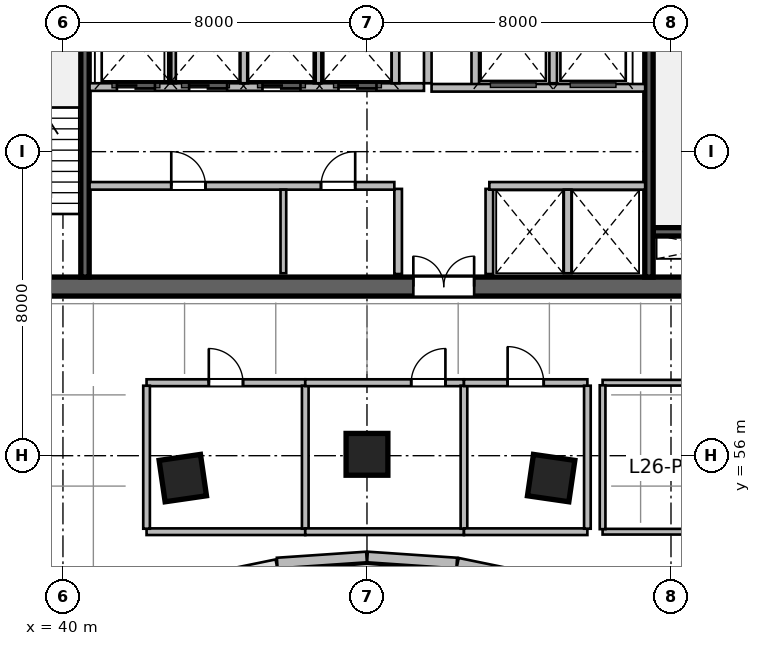
"""IFC4 building model, lengths in metres.
Left out: names, types, materials, properties, quantities, classifications, styles, units other than length and angle.
Written with IfcOpenShell. Run it as: python <this file> out.ifc"""

import sys

from ifc_helpers import new_model, si_unit, direction, frame, frame_2d, origin, origin_2d, place, context, subcontext, project, spatial, rectangle, extrude, source, transform, mapped, element, fill, save


model = new_model("IFC4")
c1 = context("Model", 3, precision=1e-05, world=origin(), true_north=direction((0.0, 1.0)))
c2 = subcontext(c1, "Body", "Model", "MODEL_VIEW")
j1 = project(units=[si_unit("LENGTHUNIT", "METRE"), si_unit("PLANEANGLEUNIT", "RADIAN")], contexts=[c1])
p1 = place(None, origin())
s1 = spatial("IfcSite", under=j1, at=p1, CompositionType="ELEMENT")
p2 = place(p1, origin())
s2 = spatial("IfcBuilding", under=s1, at=p2, CompositionType="ELEMENT")
p3 = place(p2, frame((0.0, 0.0, 111.6)))
s3 = spatial("IfcBuildingStorey", under=s2, at=p3, CompositionType="ELEMENT", Elevation=111.6)
m1 = source(origin(), c2, "Body", "SweptSolid", [
    extrude(rectangle(XDim=21.6, YDim=0.5, at=frame_2d((10.8, 0.0))), origin(), (0.0, 0.0, 1.0), 3.9),
])
p4 = place(p3, frame((37.2, 60.45, 0.0), z_axis=(0.0, 0.0, 1.0), x_axis=(1.0, 0.0, 0.0)))
e1 = element("IfcWall", 1, at=p4, inside=s3, PredefinedType="SHEAR", context=c2, shape_type="MappedRepresentation", body=[
    mapped(m1, transform((0.0, 0.0, 0.0), scale=1.0)),
])
p5 = place(p4, frame((1.1, 0.0, 0.0)))
e2 = element("IfcOpeningElement", 2, at=p5, cuts=e1, PredefinedType="OPENING", context=c2, shape_type="SweptSolid", body=[
    extrude(rectangle(XDim=1.15, YDim=2.15, at=frame_2d((0.575, 1.075))), frame((0.0, 0.26, 0.0), z_axis=(0.0, -1.0, 0.0), x_axis=(1.0, 0.0, 0.0)), (0.0, 0.0, 1.0), 0.52),
])
p6 = place(p4, frame((19.5, 0.0, 0.0)))
e3 = element("IfcOpeningElement", 3, at=p6, cuts=e1, PredefinedType="OPENING", context=c2, shape_type="SweptSolid", body=[
    extrude(rectangle(XDim=0.9, YDim=2.1, at=frame_2d((0.45, 1.05))), frame((0.0, 0.26, 0.0), z_axis=(0.0, -1.0, 0.0), x_axis=(1.0, 0.0, 0.0)), (0.0, 0.0, 1.0), 0.52),
])
p7 = place(p4, frame((12.02, 0.0, 0.0)))
e4 = element("IfcOpeningElement", 4, at=p7, cuts=e1, PredefinedType="OPENING", context=c2, shape_type="SweptSolid", body=[
    extrude(rectangle(XDim=1.6, YDim=2.15, at=frame_2d((0.8, 1.075))), frame((0.0, 0.26, 0.0), z_axis=(0.0, -1.0, 0.0), x_axis=(1.0, 0.0, 0.0)), (0.0, 0.0, 1.0), 0.52),
])
m2 = source(origin(), c2, "Body", "SweptSolid", [
    extrude(rectangle(XDim=3.27, YDim=0.22, at=frame_2d((1.635, 0.0))), origin(), (0.0, 0.0, 1.0), 3.9),
])
p8 = place(p3, frame((55.53, 61.89, 0.0), z_axis=(0.0, 0.0, 1.0), x_axis=(1.0, 0.0, 0.0)))
e5 = element("IfcWall", 5, at=p8, inside=s3, PredefinedType="SHEAR", context=c2, shape_type="MappedRepresentation", body=[
    mapped(m2, transform((0.0, 0.0, 0.0), scale=1.0)),
])
m3 = source(origin(), c2, "Body", "SweptSolid", [
    extrude(rectangle(XDim=11.0, YDim=0.22, at=frame_2d((5.5, 0.0))), origin(), (0.0, 0.0, 1.0), 3.9),
])
p9 = place(p3, frame((40.58, 60.7, 0.0), z_axis=(0.0, 0.0, 1.0), x_axis=(0.0, 1.0, 0.0)))
e6 = element("IfcWall", 6, at=p9, inside=s3, PredefinedType="SHEAR", context=c2, shape_type="MappedRepresentation", body=[
    mapped(m3, transform((0.0, 0.0, 0.0), scale=1.0)),
])
p10 = place(p3, frame((55.42, 60.7, 0.0), z_axis=(0.0, 0.0, 1.0), x_axis=(0.0, 1.0, 0.0)))
e7 = element("IfcWall", 7, at=p10, inside=s3, PredefinedType="SHEAR", context=c2, shape_type="MappedRepresentation", body=[
    mapped(m3, transform((0.0, 0.0, 0.0), scale=1.0)),
])
p11 = place(p10, frame((9.545, 0.0, 0.0)))
e8 = element("IfcOpeningElement", 8, at=p11, cuts=e7, PredefinedType="OPENING", context=c2, shape_type="SweptSolid", body=[
    extrude(rectangle(XDim=1.15, YDim=2.15, at=frame_2d((0.575, 1.075))), frame((0.0, 0.12, 0.0), z_axis=(0.0, -1.0, 0.0), x_axis=(1.0, 0.0, 0.0)), (0.0, 0.0, 1.0), 0.24),
])
m4 = source(origin(), c2, "Body", "SweptSolid", [
    extrude(rectangle(XDim=1.1, YDim=1.1, at=origin_2d()), origin(), (0.0, 0.0, 1.0), 3.9),
])
for number, where, z_axis, x_axis in (
    (9, (43.154, 55.411, 0.0), (0.0, 0.0, 1.0), (-0.143, 0.99, 0.0)),
    (10, (48.0, 56.036, 0.0), (0.0, 0.0, 1.0), (0.0, 1.0, 0.0)),
    (11, (52.846, 55.411, 0.0), (0.0, 0.0, 1.0), (0.143, 0.99, 0.0)),
):
    element("IfcColumn", number, at=place(p3, frame(where, z_axis=z_axis, x_axis=x_axis)), inside=s3, PredefinedType="COLUMN", context=c2, shape_type="MappedRepresentation", body=[
        mapped(m4, transform((0.0, 0.0, 0.0), scale=1.0)),
    ])
m5 = source(origin(), c2, "Body", "SweptSolid", [
    extrude(rectangle(XDim=2.374, YDim=0.28, at=frame_2d((1.187, 0.0))), origin(), (0.0, 0.0, 1.0), 3.65),
])
p12 = place(p3, frame((52.711, 52.695, 0.0), z_axis=(0.0, 0.0, 1.0), x_axis=(-0.979619827472, 0.200860632341, 0.0)))
e12 = element("IfcWall", 12, at=p12, inside=s3, PredefinedType="SOLIDWALL", context=c2, shape_type="MappedRepresentation", body=[
    mapped(m5, transform((0.0, 0.0, 0.0), scale=1.0)),
])
m6 = source(origin(), c2, "Body", "SweptSolid", [
    extrude(rectangle(XDim=2.355, YDim=0.28, at=frame_2d((1.177, 0.0))), origin(), (0.0, 0.0, 1.0), 3.65),
])
for number, where, z_axis, x_axis in (
    (13, (50.362, 53.175, 0.0), (0.0, 0.0, 1.0), (-0.998, 0.068, 0.0)),
    (14, (47.988, 53.335, 0.0), (0.0, 0.0, 1.0), (-0.998, -0.068, 0.0)),
):
    element("IfcWall", number, at=place(p3, frame(where, z_axis=z_axis, x_axis=x_axis)), inside=s3, PredefinedType="SOLIDWALL", context=c2, shape_type="MappedRepresentation", body=[
        mapped(m6, transform((0.0, 0.0, 0.0), scale=1.0)),
    ])
m7 = source(origin(), c2, "Body", "SweptSolid", [
    extrude(rectangle(XDim=2.24, YDim=0.2, at=frame_2d((1.12, 0.0))), origin(), (0.0, 0.0, 1.0), 3.65),
])
for number, where, z_axis, x_axis in (
    (15, (48.82, 60.78, 0.0), (0.0, 0.0, 1.0), (0.0, 1.0, 0.0)),
    (16, (51.22, 60.78, 0.0), (0.0, 0.0, 1.0), (0.0, 1.0, 0.0)),
):
    element("IfcWall", number, at=place(p3, frame(where, z_axis=z_axis, x_axis=x_axis)), inside=s3, PredefinedType="SOLIDWALL", context=c2, shape_type="MappedRepresentation", body=[
        mapped(m7, transform((0.0, 0.0, 0.0), scale=1.0)),
    ])
m8 = source(origin(), c2, "Body", "SweptSolid", [
    extrude(rectangle(XDim=5.8, YDim=0.2, at=frame_2d((2.9, 0.0))), origin(), (0.0, 0.0, 1.0), 3.65),
])
p13 = place(p3, frame((49.6, 65.8, 0.0), z_axis=(0.0, 0.0, 1.0), x_axis=(0.0, 1.0, 0.0)))
e17 = element("IfcWall", 17, at=p13, inside=s3, PredefinedType="SOLIDWALL", context=c2, shape_type="MappedRepresentation", body=[
    mapped(m8, transform((0.0, 0.0, 0.0), scale=1.0)),
])
m9 = source(origin(), c2, "Body", "SweptSolid", [
    extrude(rectangle(XDim=2.58, YDim=0.2, at=frame_2d((1.29, 0.0))), origin(), (0.0, 0.0, 1.0), 3.65),
])
p14 = place(p3, frame((50.85, 65.68, 0.0), z_axis=(0.0, 0.0, 1.0), x_axis=(0.0, 1.0, 0.0)))
e18 = element("IfcWall", 18, at=p14, inside=s3, PredefinedType="SOLIDWALL", context=c2, shape_type="MappedRepresentation", body=[
    mapped(m9, transform((0.0, 0.0, 0.0), scale=1.0)),
])
m10 = source(origin(), c2, "Body", "SweptSolid", [
    extrude(rectangle(XDim=2.4, YDim=0.2, at=frame_2d((1.2, 0.0))), origin(), (0.0, 0.0, 1.0), 3.65),
])
p15 = place(p3, frame((52.9, 65.8, 0.0), z_axis=(0.0, 0.0, 1.0), x_axis=(0.0, 1.0, 0.0)))
e19 = element("IfcWall", 19, at=p15, inside=s3, PredefinedType="SOLIDWALL", context=c2, shape_type="MappedRepresentation", body=[
    mapped(m10, transform((0.0, 0.0, 0.0), scale=1.0)),
])
m11 = source(origin(), c2, "Body", "SweptSolid", [
    extrude(rectangle(XDim=5.62, YDim=0.2, at=frame_2d((2.81, 0.0))), origin(), (0.0, 0.0, 1.0), 3.65),
])
p16 = place(p3, frame((49.7, 65.68, 0.0), z_axis=(0.0, 0.0, 1.0), x_axis=(1.0, 0.0, 0.0)))
e20 = element("IfcWall", 20, at=p16, inside=s3, PredefinedType="SOLIDWALL", context=c2, shape_type="MappedRepresentation", body=[
    mapped(m11, transform((0.0, 0.0, 0.0), scale=1.0)),
])
m12 = source(origin(), c2, "Body", "SweptSolid", [
    extrude(rectangle(XDim=8.02, YDim=0.2, at=frame_2d((4.01, 0.0))), origin(), (0.0, 0.0, 1.0), 3.65),
])
p17 = place(p3, frame((40.7, 63.1, 0.0), z_axis=(0.0, 0.0, 1.0), x_axis=(1.0, 0.0, 0.0)))
e21 = element("IfcWall", 21, at=p17, inside=s3, PredefinedType="SOLIDWALL", context=c2, shape_type="MappedRepresentation", body=[
    mapped(m12, transform((0.0, 0.0, 0.0), scale=1.0)),
])
p18 = place(p17, frame((2.15, 0.0, 0.0)))
e22 = element("IfcOpeningElement", 22, at=p18, cuts=e21, PredefinedType="OPENING", context=c2, shape_type="SweptSolid", body=[
    extrude(rectangle(XDim=0.9, YDim=2.1, at=frame_2d((0.45, 1.05))), frame((0.0, 0.11, 0.0), z_axis=(0.0, -1.0, 0.0), x_axis=(1.0, 0.0, 0.0)), (0.0, 0.0, 1.0), 0.22),
])
p19 = place(p17, frame((6.09, 0.0, 0.0)))
e23 = element("IfcOpeningElement", 23, at=p19, cuts=e21, PredefinedType="OPENING", context=c2, shape_type="SweptSolid", body=[
    extrude(rectangle(XDim=0.9, YDim=2.1, at=frame_2d((0.45, 1.05))), frame((0.0, 0.11, 0.0), z_axis=(0.0, -1.0, 0.0), x_axis=(1.0, 0.0, 0.0)), (0.0, 0.0, 1.0), 0.22),
])
m13 = source(origin(), c2, "Body", "SweptSolid", [
    extrude(rectangle(XDim=4.1, YDim=0.2, at=frame_2d((2.05, 0.0))), origin(), (0.0, 0.0, 1.0), 3.65),
])
p20 = place(p3, frame((51.22, 63.1, 0.0), z_axis=(0.0, 0.0, 1.0), x_axis=(1.0, 0.0, 0.0)))
e24 = element("IfcWall", 24, at=p20, inside=s3, PredefinedType="SOLIDWALL", context=c2, shape_type="MappedRepresentation", body=[
    mapped(m13, transform((0.0, 0.0, 0.0), scale=1.0)),
])
m14 = source(origin(), c2, "Body", "SweptSolid", [
    extrude(rectangle(XDim=2.2, YDim=0.15, at=frame_2d((1.1, 0.0))), origin(), (0.0, 0.0, 1.0), 3.65),
])
p21 = place(p3, frame((45.8, 60.8, 0.0), z_axis=(0.0, 0.0, 1.0), x_axis=(0.0, 1.0, 0.0)))
e25 = element("IfcWall", 25, at=p21, inside=s3, PredefinedType="PARTITIONING", context=c2, shape_type="MappedRepresentation", body=[
    mapped(m14, transform((0.0, 0.0, 0.0), scale=1.0)),
])
m15 = source(origin(), c2, "Body", "SweptSolid", [
    extrude(rectangle(XDim=2.2, YDim=0.2, at=frame_2d((1.1, 0.0))), origin(), (0.0, 0.0, 1.0), 3.65),
])
p22 = place(p3, frame((53.28, 60.8, 0.0), z_axis=(0.0, 0.0, 1.0), x_axis=(0.0, 1.0, 0.0)))
e26 = element("IfcWall", 26, at=p22, inside=s3, PredefinedType="SOLIDWALL", context=c2, shape_type="MappedRepresentation", body=[
    mapped(m15, transform((0.0, 0.0, 0.0), scale=1.0)),
])
m16 = source(origin(), c2, "Body", "SweptSolid", [
    extrude(rectangle(XDim=8.8, YDim=0.2, at=frame_2d((4.4, 0.0))), origin(), (0.0, 0.0, 1.0), 3.65),
])
p23 = place(p3, frame((40.7, 65.7, 0.0), z_axis=(0.0, 0.0, 1.0), x_axis=(1.0, 0.0, 0.0)))
e27 = element("IfcWall", 27, at=p23, inside=s3, PredefinedType="SOLIDWALL", context=c2, shape_type="MappedRepresentation", body=[
    mapped(m16, transform((0.0, 0.0, 0.0), scale=1.0)),
])
p24 = place(p23, frame((0.72, 0.0, 0.0)))
e28 = element("IfcOpeningElement", 28, at=p24, cuts=e27, PredefinedType="OPENING", context=c2, shape_type="SweptSolid", body=[
    extrude(rectangle(XDim=1.0, YDim=2.15, at=frame_2d((0.5, 1.075))), frame((0.0, 0.11, 0.0), z_axis=(0.0, -1.0, 0.0), x_axis=(1.0, 0.0, 0.0)), (0.0, 0.0, 1.0), 0.22),
])
p25 = place(p23, frame((2.62, 0.0, 0.0)))
e29 = element("IfcOpeningElement", 29, at=p25, cuts=e27, PredefinedType="OPENING", context=c2, shape_type="SweptSolid", body=[
    extrude(rectangle(XDim=1.0, YDim=2.15, at=frame_2d((0.5, 1.075))), frame((0.0, 0.11, 0.0), z_axis=(0.0, -1.0, 0.0), x_axis=(1.0, 0.0, 0.0)), (0.0, 0.0, 1.0), 0.22),
])
p26 = place(p23, frame((4.55, 0.0, 0.0)))
e30 = element("IfcOpeningElement", 30, at=p26, cuts=e27, PredefinedType="OPENING", context=c2, shape_type="SweptSolid", body=[
    extrude(rectangle(XDim=1.0, YDim=2.15, at=frame_2d((0.5, 1.075))), frame((0.0, 0.11, 0.0), z_axis=(0.0, -1.0, 0.0), x_axis=(1.0, 0.0, 0.0)), (0.0, 0.0, 1.0), 0.22),
])
p27 = place(p23, frame((6.55, 0.0, 0.0)))
e31 = element("IfcOpeningElement", 31, at=p27, cuts=e27, PredefinedType="OPENING", context=c2, shape_type="SweptSolid", body=[
    extrude(rectangle(XDim=1.0, YDim=2.15, at=frame_2d((0.5, 1.075))), frame((0.0, 0.11, 0.0), z_axis=(0.0, -1.0, 0.0), x_axis=(1.0, 0.0, 0.0)), (0.0, 0.0, 1.0), 0.22),
])
for number, where, z_axis, x_axis in (
    (32, (48.75, 65.8, 0.0), (0.0, 0.0, 1.0), (0.0, 1.0, 0.0)),
    (33, (42.87, 65.8, 0.0), (0.0, 0.0, 1.0), (0.0, 1.0, 0.0)),
    (34, (44.77, 65.8, 0.0), (0.0, 0.0, 1.0), (0.0, 1.0, 0.0)),
    (35, (46.7, 65.8, 0.0), (0.0, 0.0, 1.0), (0.0, 1.0, 0.0)),
):
    element("IfcWall", number, at=place(p3, frame(where, z_axis=z_axis, x_axis=x_axis)), inside=s3, PredefinedType="SOLIDWALL", context=c2, shape_type="MappedRepresentation", body=[
        mapped(m10, transform((0.0, 0.0, 0.0), scale=1.0)),
    ])
m17 = source(origin(), c2, "Body", "SweptSolid", [
    extrude(rectangle(XDim=4.176, YDim=0.175, at=frame_2d((2.088, 0.0))), origin(), (0.0, 0.0, 1.0), 3.65),
])
p28 = place(p3, frame((42.2, 54.0, 0.0), z_axis=(0.0, 0.0, 1.0), x_axis=(1.0, 0.0, 0.0)))
e36 = element("IfcWall", 36, at=p28, inside=s3, PredefinedType="PARTITIONING", context=c2, shape_type="MappedRepresentation", body=[
    mapped(m17, transform((0.0, 0.0, 0.0), scale=1.0)),
])
m18 = source(origin(), c2, "Body", "SweptSolid", [
    extrude(rectangle(XDim=4.176, YDim=0.18, at=frame_2d((2.088, 0.0))), origin(), (0.0, 0.0, 1.0), 3.65),
])
p29 = place(p3, frame((42.2, 57.92, 0.0), z_axis=(0.0, 0.0, 1.0), x_axis=(1.0, 0.0, 0.0)))
e37 = element("IfcWall", 37, at=p29, inside=s3, PredefinedType="PLUMBINGWALL", context=c2, shape_type="MappedRepresentation", body=[
    mapped(m18, transform((0.0, 0.0, 0.0), scale=1.0)),
])
p30 = place(p29, frame((1.638, 0.0, 0.0)))
e38 = element("IfcOpeningElement", 38, at=p30, cuts=e37, PredefinedType="OPENING", context=c2, shape_type="SweptSolid", body=[
    extrude(rectangle(XDim=0.9, YDim=2.08, at=frame_2d((0.45, 1.04))), frame((0.0, 0.1, 0.0), z_axis=(0.0, -1.0, 0.0), x_axis=(1.0, 0.0, 0.0)), (0.0, 0.0, 1.0), 0.2),
])
m19 = source(origin(), c2, "Body", "SweptSolid", [
    extrude(rectangle(XDim=3.763, YDim=0.175, at=frame_2d((1.881, 0.0))), origin(), (0.0, 0.0, 1.0), 3.65),
])
for number, where, z_axis, x_axis in (
    (39, (42.2, 54.079, 0.0), (0.0, 0.0, 1.0), (0.0, 1.0, 0.0)),
    (40, (46.376, 54.079, 0.0), (0.0, 0.0, 1.0), (0.0, 1.0, 0.0)),
):
    element("IfcWall", number, at=place(p3, frame(where, z_axis=z_axis, x_axis=x_axis)), inside=s3, PredefinedType="PARTITIONING", context=c2, shape_type="MappedRepresentation", body=[
        mapped(m19, transform((0.0, 0.0, 0.0), scale=1.0)),
    ])
p31 = place(p3, frame((46.376, 54.0, 0.0), z_axis=(0.0, 0.0, 1.0), x_axis=(1.0, 0.0, 0.0)))
e41 = element("IfcWall", 41, at=p31, inside=s3, PredefinedType="PARTITIONING", context=c2, shape_type="MappedRepresentation", body=[
    mapped(m17, transform((0.0, 0.0, 0.0), scale=1.0)),
])
p32 = place(p3, frame((46.376, 57.92, 0.0), z_axis=(0.0, 0.0, 1.0), x_axis=(1.0, 0.0, 0.0)))
e42 = element("IfcWall", 42, at=p32, inside=s3, PredefinedType="PLUMBINGWALL", context=c2, shape_type="MappedRepresentation", body=[
    mapped(m18, transform((0.0, 0.0, 0.0), scale=1.0)),
])
p33 = place(p32, frame((2.788, 0.0, 0.0)))
e43 = element("IfcOpeningElement", 43, at=p33, cuts=e42, PredefinedType="OPENING", context=c2, shape_type="SweptSolid", body=[
    extrude(rectangle(XDim=0.9, YDim=2.08, at=frame_2d((0.45, 1.04))), frame((0.0, 0.1, 0.0), z_axis=(0.0, -1.0, 0.0), x_axis=(1.0, 0.0, 0.0)), (0.0, 0.0, 1.0), 0.2),
])
p34 = place(p3, frame((50.552, 54.079, 0.0), z_axis=(0.0, 0.0, 1.0), x_axis=(0.0, 1.0, 0.0)))
e44 = element("IfcWall", 44, at=p34, inside=s3, PredefinedType="PARTITIONING", context=c2, shape_type="MappedRepresentation", body=[
    mapped(m19, transform((0.0, 0.0, 0.0), scale=1.0)),
])
m20 = source(origin(), c2, "Body", "SweptSolid", [
    extrude(rectangle(XDim=3.248, YDim=0.175, at=frame_2d((1.624, 0.0))), origin(), (0.0, 0.0, 1.0), 3.65),
])
p35 = place(p3, frame((50.552, 54.0, 0.0), z_axis=(0.0, 0.0, 1.0), x_axis=(1.0, 0.0, 0.0)))
e45 = element("IfcWall", 45, at=p35, inside=s3, PredefinedType="PARTITIONING", context=c2, shape_type="MappedRepresentation", body=[
    mapped(m20, transform((0.0, 0.0, 0.0), scale=1.0)),
])
m21 = source(origin(), c2, "Body", "SweptSolid", [
    extrude(rectangle(XDim=3.248, YDim=0.18, at=frame_2d((1.624, 0.0))), origin(), (0.0, 0.0, 1.0), 3.65),
])
p36 = place(p3, frame((50.552, 57.92, 0.0), z_axis=(0.0, 0.0, 1.0), x_axis=(1.0, 0.0, 0.0)))
e46 = element("IfcWall", 46, at=p36, inside=s3, PredefinedType="PLUMBINGWALL", context=c2, shape_type="MappedRepresentation", body=[
    mapped(m21, transform((0.0, 0.0, 0.0), scale=1.0)),
])
p37 = place(p36, frame((1.149, 0.0, 0.0)))
e47 = element("IfcOpeningElement", 47, at=p37, cuts=e46, PredefinedType="OPENING", context=c2, shape_type="SweptSolid", body=[
    extrude(rectangle(XDim=0.95, YDim=2.12, at=frame_2d((0.475, 1.06))), frame((0.0, 0.1, 0.0), z_axis=(0.0, -1.0, 0.0), x_axis=(1.0, 0.0, 0.0)), (0.0, 0.0, 1.0), 0.2),
])
p38 = place(p3, frame((53.8, 54.079, 0.0), z_axis=(0.0, 0.0, 1.0), x_axis=(0.0, 1.0, 0.0)))
e48 = element("IfcWall", 48, at=p38, inside=s3, PredefinedType="PARTITIONING", context=c2, shape_type="MappedRepresentation", body=[
    mapped(m19, transform((0.0, 0.0, 0.0), scale=1.0)),
])
m22 = source(origin(), c2, "Body", "SweptSolid", [
    extrude(rectangle(XDim=6.6, YDim=0.15, at=frame_2d((3.3, 0.0))), origin(), (0.0, 0.0, 1.0), 3.095),
])
p39 = place(p3, frame((54.2, 54.0, 0.0), z_axis=(0.0, 0.0, 1.0), x_axis=(1.0, 0.0, 0.0)))
e49 = element("IfcWall", 49, at=p39, inside=s3, PredefinedType="PARTITIONING", context=c2, shape_type="MappedRepresentation", body=[
    mapped(m22, transform((0.0, 0.0, 0.0), scale=1.0)),
])
m23 = source(origin(), c2, "Body", "SweptSolid", [
    extrude(rectangle(XDim=6.6, YDim=0.15, at=frame_2d((3.3, 0.0))), origin(), (0.0, 0.0, 1.0), 3.65),
])
p40 = place(p3, frame((54.2, 57.92, 0.0), z_axis=(0.0, 0.0, 1.0), x_axis=(1.0, 0.0, 0.0)))
e50 = element("IfcWall", 50, at=p40, inside=s3, PredefinedType="PARTITIONING", context=c2, shape_type="MappedRepresentation", body=[
    mapped(m23, transform((0.0, 0.0, 0.0), scale=1.0)),
])
p41 = place(p40, frame((2.825, 0.0, 0.0)))
e51 = element("IfcOpeningElement", 51, at=p41, cuts=e50, PredefinedType="OPENING", context=c2, shape_type="SweptSolid", body=[
    extrude(rectangle(XDim=0.95, YDim=2.1, at=frame_2d((0.475, 1.05))), frame((0.0, 0.085, 0.0), z_axis=(0.0, -1.0, 0.0), x_axis=(1.0, 0.0, 0.0)), (0.0, 0.0, 1.0), 0.17),
])
m24 = source(origin(), c2, "Body", "SweptSolid", [
    extrude(rectangle(XDim=3.785, YDim=0.15, at=frame_2d((1.893, 0.0))), origin(), (0.0, 0.0, 1.0), 3.65),
])
p42 = place(p3, frame((54.2, 54.067, 0.0), z_axis=(0.0, 0.0, 1.0), x_axis=(0.0, 1.0, 0.0)))
e52 = element("IfcWall", 52, at=p42, inside=s3, PredefinedType="PARTITIONING", context=c2, shape_type="MappedRepresentation", body=[
    mapped(m24, transform((0.0, 0.0, 0.0), scale=1.0)),
])
m25 = source(origin(), c2, "Body", "SweptSolid", [
    extrude(rectangle(XDim=1.6, YDim=2.15, at=frame_2d((0.8, 1.075))), frame((0.0, 0.025, 0.0), z_axis=(0.0, -1.0, 0.0), x_axis=(1.0, 0.0, 0.0)), (0.0, 0.0, 1.0), 0.05),
])
p43 = place(p7, origin())
e53 = element("IfcDoor", 53, at=p43, inside=s3, OperationType="DOUBLE_DOOR_SINGLE_SWING", PredefinedType="DOOR", context=c2, shape_type="MappedRepresentation", body=[
    mapped(m25, transform((0.0, 0.0, 0.0), scale=1.0)),
])
fill(e4, e53)
m26 = source(origin(), c2, "Body", "SweptSolid", [
    extrude(rectangle(XDim=0.9, YDim=2.1, at=frame_2d((0.45, 1.05))), frame((0.0, 0.025, 0.0), z_axis=(0.0, -1.0, 0.0), x_axis=(1.0, 0.0, 0.0)), (0.0, 0.0, 1.0), 0.05),
])
p44 = place(p18, origin())
e54 = element("IfcDoor", 54, at=p44, inside=s3, OperationType="SINGLE_SWING_LEFT", PredefinedType="DOOR", context=c2, shape_type="MappedRepresentation", body=[
    mapped(m26, transform((0.0, 0.0, 0.0), scale=1.0)),
])
fill(e22, e54)
p45 = place(p19, origin())
e55 = element("IfcDoor", 55, at=p45, inside=s3, OperationType="SINGLE_SWING_RIGHT", PredefinedType="DOOR", context=c2, shape_type="MappedRepresentation", body=[
    mapped(m26, transform((0.0, 0.0, 0.0), scale=1.0)),
])
fill(e23, e55)
m27 = source(origin(), c2, "Body", "SweptSolid", [
    extrude(rectangle(XDim=1.0, YDim=2.15, at=frame_2d((0.5, 1.075))), frame((0.0, 0.025, 0.0), z_axis=(0.0, -1.0, 0.0), x_axis=(1.0, 0.0, 0.0)), (0.0, 0.0, 1.0), 0.05),
])
p46 = place(p24, origin())
e56 = element("IfcDoor", 56, at=p46, inside=s3, OperationType="DOUBLE_DOOR_SLIDING", PredefinedType="DOOR", context=c2, shape_type="MappedRepresentation", body=[
    mapped(m27, transform((0.0, 0.0, 0.0), scale=1.0)),
])
fill(e28, e56)
p47 = place(p25, origin())
e57 = element("IfcDoor", 57, at=p47, inside=s3, OperationType="DOUBLE_DOOR_SLIDING", PredefinedType="DOOR", context=c2, shape_type="MappedRepresentation", body=[
    mapped(m27, transform((0.0, 0.0, 0.0), scale=1.0)),
])
fill(e29, e57)
p48 = place(p26, origin())
e58 = element("IfcDoor", 58, at=p48, inside=s3, OperationType="DOUBLE_DOOR_SLIDING", PredefinedType="DOOR", context=c2, shape_type="MappedRepresentation", body=[
    mapped(m27, transform((0.0, 0.0, 0.0), scale=1.0)),
])
fill(e30, e58)
p49 = place(p27, origin())
e59 = element("IfcDoor", 59, at=p49, inside=s3, OperationType="DOUBLE_DOOR_SLIDING", PredefinedType="DOOR", context=c2, shape_type="MappedRepresentation", body=[
    mapped(m27, transform((0.0, 0.0, 0.0), scale=1.0)),
])
fill(e31, e59)
m28 = source(origin(), c2, "Body", "SweptSolid", [
    extrude(rectangle(XDim=0.9, YDim=2.08, at=frame_2d((0.45, 1.04))), frame((0.0, 0.025, 0.0), z_axis=(0.0, -1.0, 0.0), x_axis=(1.0, 0.0, 0.0)), (0.0, 0.0, 1.0), 0.05),
])
p50 = place(p30, origin())
e60 = element("IfcDoor", 60, at=p50, inside=s3, OperationType="SINGLE_SWING_LEFT", PredefinedType="DOOR", context=c2, shape_type="MappedRepresentation", body=[
    mapped(m28, transform((0.0, 0.0, 0.0), scale=1.0)),
])
fill(e38, e60)
p51 = place(p33, origin())
e61 = element("IfcDoor", 61, at=p51, inside=s3, OperationType="SINGLE_SWING_RIGHT", PredefinedType="DOOR", context=c2, shape_type="MappedRepresentation", body=[
    mapped(m28, transform((0.0, 0.0, 0.0), scale=1.0)),
])
fill(e43, e61)
m29 = source(origin(), c2, "Body", "SweptSolid", [
    extrude(rectangle(XDim=0.95, YDim=2.12, at=frame_2d((0.475, 1.06))), frame((0.0, 0.025, 0.0), z_axis=(0.0, -1.0, 0.0), x_axis=(1.0, 0.0, 0.0)), (0.0, 0.0, 1.0), 0.05),
])
p52 = place(p37, origin())
e62 = element("IfcDoor", 62, at=p52, inside=s3, OperationType="SINGLE_SWING_LEFT", PredefinedType="DOOR", context=c2, shape_type="MappedRepresentation", body=[
    mapped(m29, transform((0.0, 0.0, 0.0), scale=1.0)),
])
fill(e47, e62)
save(model, sys.argv[1])
